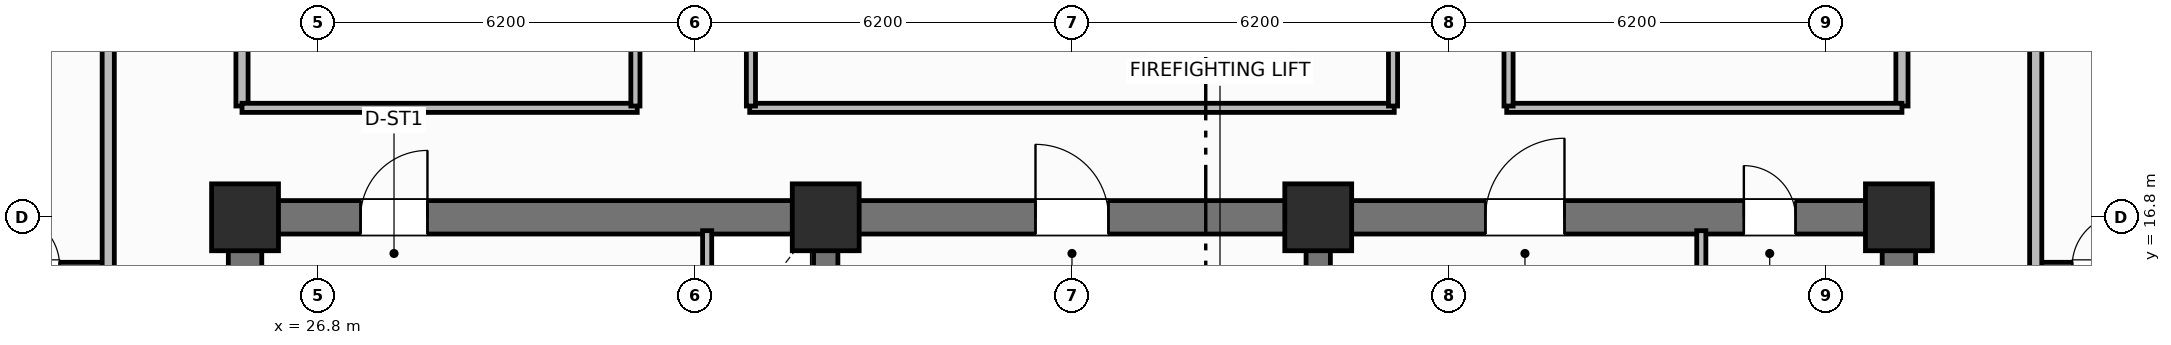
"""IFC4 building model, lengths in metres.
Left out: names, types, materials, properties, quantities, classifications, styles, units other than length and angle.
Written with IfcOpenShell. Run it as: python <this file> out.ifc"""

import sys

from ifc_helpers import new_model, si_unit, direction, frame, frame_2d, origin, origin_2d, place, context, subcontext, project, spatial, rectangle, extrude, element, fill, save


model = new_model("IFC4")
c1 = context("Model", 3, precision=1e-05, world=origin(), true_north=direction((0.0, 1.0)))
c2 = subcontext(c1, "Body", "Model", "MODEL_VIEW")
j1 = project(units=[si_unit("LENGTHUNIT", "METRE"), si_unit("PLANEANGLEUNIT", "RADIAN")], contexts=[c1])
p1 = place(None, origin())
s1 = spatial("IfcSite", under=j1, at=p1, CompositionType="ELEMENT")
p2 = place(p1, origin())
s2 = spatial("IfcBuilding", under=s1, at=p2, CompositionType="ELEMENT")
p3 = place(p2, frame((0.0, 0.0, 88.3)))
s3 = spatial("IfcBuildingStorey", under=s2, at=p3, CompositionType="ELEMENT", Elevation=88.3)
for number, where, z_axis, x_axis in (
    (1, (25.6, 10.875, 0.0), (0.0, 0.0, 1.0), (0.0, 1.0, 0.0)),
    (2, (52.8, 10.875, 0.0), (0.0, 0.0, 1.0), (0.0, 1.0, 0.0)),
):
    element("IfcWall", number, at=place(p3, frame(where, z_axis=z_axis, x_axis=x_axis)), inside=s3, PredefinedType="SHEAR", context=c2, shape_type="SweptSolid", body=[
        extrude(rectangle(XDim=5.65, YDim=0.55, at=frame_2d((2.825, 0.0))), origin(), (0.0, 0.0, 1.0), 3.7),
    ])
p4 = place(p3, frame((25.6, 16.8, 0.0), z_axis=(0.0, 0.0, 1.0), x_axis=(1.0, 0.0, 0.0)))
e3 = element("IfcWall", 3, at=p4, inside=s3, PredefinedType="SHEAR", context=c2, shape_type="SweptSolid", body=[
    extrude(rectangle(XDim=27.2, YDim=0.55, at=frame_2d((13.6, 0.0))), origin(), (0.0, 0.0, 1.0), 3.7),
])
p5 = place(p4, frame((1.9, 0.0, 0.0)))
e4 = element("IfcOpeningElement", 4, at=p5, cuts=e3, PredefinedType="OPENING", context=c2, shape_type="SweptSolid", body=[
    extrude(rectangle(XDim=1.1, YDim=2.15, at=frame_2d((0.55, 1.075))), frame((0.0, 0.285, 0.0), z_axis=(0.0, -1.0, 0.0), x_axis=(1.0, 0.0, 0.0)), (0.0, 0.0, 1.0), 0.57),
])
p6 = place(p4, frame((13.0, 0.0, 0.0)))
e5 = element("IfcOpeningElement", 5, at=p6, cuts=e3, PredefinedType="OPENING", context=c2, shape_type="SweptSolid", body=[
    extrude(rectangle(XDim=1.2, YDim=2.15, at=frame_2d((0.6, 1.075))), frame((0.0, 0.285, 0.0), z_axis=(0.0, -1.0, 0.0), x_axis=(1.0, 0.0, 0.0)), (0.0, 0.0, 1.0), 0.57),
])
p7 = place(p4, frame((20.4, 0.0, 0.0)))
e6 = element("IfcOpeningElement", 6, at=p7, cuts=e3, PredefinedType="OPENING", context=c2, shape_type="SweptSolid", body=[
    extrude(rectangle(XDim=1.3, YDim=2.2, at=frame_2d((0.65, 1.1))), frame((0.0, 0.285, 0.0), z_axis=(0.0, -1.0, 0.0), x_axis=(1.0, 0.0, 0.0)), (0.0, 0.0, 1.0), 0.57),
])
p8 = place(p4, frame((24.65, 0.0, 0.0)))
e7 = element("IfcOpeningElement", 7, at=p8, cuts=e3, PredefinedType="OPENING", context=c2, shape_type="SweptSolid", body=[
    extrude(rectangle(XDim=0.85, YDim=2.1, at=frame_2d((0.425, 1.05))), frame((0.0, 0.285, 0.0), z_axis=(0.0, -1.0, 0.0), x_axis=(1.0, 0.0, 0.0)), (0.0, 0.0, 1.0), 0.57),
])
for number, where, z_axis, x_axis in (
    (8, (35.15, 10.875, 0.0), (0.0, 0.0, 1.0), (0.0, 1.0, 0.0)),
    (9, (43.25, 10.875, 0.0), (0.0, 0.0, 1.0), (0.0, 1.0, 0.0)),
):
    element("IfcWall", number, at=place(p3, frame(where, z_axis=z_axis, x_axis=x_axis)), inside=s3, PredefinedType="SHEAR", context=c2, shape_type="SweptSolid", body=[
        extrude(rectangle(XDim=5.65, YDim=0.4, at=frame_2d((2.825, 0.0))), origin(), (0.0, 0.0, 1.0), 3.7),
    ])
for number, where, z_axis, x_axis in (
    (10, (25.6, 16.8, 0.0), (0.0, 0.0, 1.0), (1.0, 0.0, 0.0)),
    (11, (35.15, 16.8, 0.0), (0.0, 0.0, 1.0), (1.0, 0.0, 0.0)),
    (12, (43.25, 16.8, 0.0), (0.0, 0.0, 1.0), (1.0, 0.0, 0.0)),
    (13, (52.8, 16.8, 0.0), (0.0, 0.0, 1.0), (1.0, 0.0, 0.0)),
):
    element("IfcColumn", number, at=place(p3, frame(where, z_axis=z_axis, x_axis=x_axis)), inside=s3, PredefinedType="COLUMN", context=c2, shape_type="SweptSolid", body=[
        extrude(rectangle(XDim=1.1, YDim=1.1, at=origin_2d()), origin(), (0.0, 0.0, 1.0), 3.7),
    ])
p9 = place(p3, frame((33.2, 14.5, 0.0), z_axis=(0.0, 0.0, 1.0), x_axis=(0.0, 1.0, 0.0)))
e14 = element("IfcWall", 14, at=p9, inside=s3, PredefinedType="PARTITIONING", context=c2, shape_type="SweptSolid", body=[
    extrude(rectangle(XDim=2.08, YDim=0.15, at=frame_2d((1.04, 0.0))), origin(), (0.0, 0.0, 1.0), 2.53),
])
p10 = place(p9, frame((0.55, 0.0, 0.0)))
e15 = element("IfcOpeningElement", 15, at=p10, cuts=e14, PredefinedType="OPENING", context=c2, shape_type="SweptSolid", body=[
    extrude(rectangle(XDim=0.85, YDim=2.05, at=frame_2d((0.425, 1.025))), frame((0.0, 0.085, 0.0), z_axis=(0.0, -1.0, 0.0), x_axis=(1.0, 0.0, 0.0)), (0.0, 0.0, 1.0), 0.17),
])
p11 = place(p3, frame((49.55, 13.7, 0.0), z_axis=(0.0, 0.0, 1.0), x_axis=(0.0, 1.0, 0.0)))
e16 = element("IfcWall", 16, at=p11, inside=s3, PredefinedType="PARTITIONING", context=c2, shape_type="SweptSolid", body=[
    extrude(rectangle(XDim=2.88, YDim=0.15, at=frame_2d((1.44, 0.0))), origin(), (0.0, 0.0, 1.0), 2.53),
])
for number, where, z_axis, x_axis in (
    (17, (25.55, 18.63, 0.0), (0.0, 0.0, 1.0), (0.0, 1.0, 0.0)),
    (18, (52.85, 18.63, 0.0), (0.0, 0.0, 1.0), (0.0, 1.0, 0.0)),
):
    element("IfcWall", number, at=place(p3, frame(where, z_axis=z_axis, x_axis=x_axis)), inside=s3, PredefinedType="PARTITIONING", context=c2, shape_type="SweptSolid", body=[
        extrude(rectangle(XDim=19.14, YDim=0.2, at=frame_2d((9.57, 0.0))), origin(), (0.0, 0.0, 1.0), 2.53),
    ])
p12 = place(p3, frame((25.55, 18.6, 0.0), z_axis=(0.0, 0.0, 1.0), x_axis=(1.0, 0.0, 0.0)))
e19 = element("IfcWall", 19, at=p12, inside=s3, PredefinedType="PARTITIONING", context=c2, shape_type="SweptSolid", body=[
    extrude(rectangle(XDim=6.5, YDim=0.15, at=frame_2d((3.25, 0.0))), origin(), (0.0, 0.0, 1.0), 2.53),
])
p13 = place(p3, frame((33.9, 18.6, 0.0), z_axis=(0.0, 0.0, 1.0), x_axis=(1.0, 0.0, 0.0)))
e20 = element("IfcWall", 20, at=p13, inside=s3, PredefinedType="PARTITIONING", context=c2, shape_type="SweptSolid", body=[
    extrude(rectangle(XDim=10.6, YDim=0.15, at=frame_2d((5.3, 0.0))), origin(), (0.0, 0.0, 1.0), 2.53),
])
p14 = place(p3, frame((46.35, 18.6, 0.0), z_axis=(0.0, 0.0, 1.0), x_axis=(1.0, 0.0, 0.0)))
e21 = element("IfcWall", 21, at=p14, inside=s3, PredefinedType="PARTITIONING", context=c2, shape_type="SweptSolid", body=[
    extrude(rectangle(XDim=6.5, YDim=0.15, at=frame_2d((3.25, 0.0))), origin(), (0.0, 0.0, 1.0), 2.53),
])
p15 = place(p3, frame((32.02, 18.63, 0.0), z_axis=(0.0, 0.0, 1.0), x_axis=(0.0, 1.0, 0.0)))
e22 = element("IfcWall", 22, at=p15, inside=s3, PredefinedType="PARTITIONING", context=c2, shape_type="SweptSolid", body=[
    extrude(rectangle(XDim=19.14, YDim=0.15, at=frame_2d((9.57, 0.0))), origin(), (0.0, 0.0, 1.0), 2.53),
])
p16 = place(p15, frame((3.0, 0.0, 0.0)))
e23 = element("IfcOpeningElement", 23, at=p16, cuts=e22, PredefinedType="OPENING", context=c2, shape_type="SweptSolid", body=[
    extrude(rectangle(XDim=0.9, YDim=2.1, at=frame_2d((0.45, 1.05))), frame((0.0, 0.085, 0.0), z_axis=(0.0, -1.0, 0.0), x_axis=(1.0, 0.0, 0.0)), (0.0, 0.0, 1.0), 0.17),
])
p17 = place(p15, frame((11.5, 0.0, 0.0)))
e24 = element("IfcOpeningElement", 24, at=p17, cuts=e22, PredefinedType="OPENING", context=c2, shape_type="SweptSolid", body=[
    extrude(rectangle(XDim=0.9, YDim=2.1, at=frame_2d((0.45, 1.05))), frame((0.0, 0.085, 0.0), z_axis=(0.0, -1.0, 0.0), x_axis=(1.0, 0.0, 0.0)), (0.0, 0.0, 1.0), 0.17),
])
p18 = place(p3, frame((33.92, 18.63, 0.0), z_axis=(0.0, 0.0, 1.0), x_axis=(0.0, 1.0, 0.0)))
e25 = element("IfcWall", 25, at=p18, inside=s3, PredefinedType="PARTITIONING", context=c2, shape_type="SweptSolid", body=[
    extrude(rectangle(XDim=19.14, YDim=0.15, at=frame_2d((9.57, 0.0))), origin(), (0.0, 0.0, 1.0), 2.53),
])
p19 = place(p18, frame((2.4, 0.0, 0.0)))
e26 = element("IfcOpeningElement", 26, at=p19, cuts=e25, PredefinedType="OPENING", context=c2, shape_type="SweptSolid", body=[
    extrude(rectangle(XDim=0.9, YDim=2.1, at=frame_2d((0.45, 1.05))), frame((0.0, 0.085, 0.0), z_axis=(0.0, -1.0, 0.0), x_axis=(1.0, 0.0, 0.0)), (0.0, 0.0, 1.0), 0.17),
])
p20 = place(p3, frame((44.48, 18.63, 0.0), z_axis=(0.0, 0.0, 1.0), x_axis=(0.0, 1.0, 0.0)))
e27 = element("IfcWall", 27, at=p20, inside=s3, PredefinedType="PARTITIONING", context=c2, shape_type="SweptSolid", body=[
    extrude(rectangle(XDim=19.14, YDim=0.15, at=frame_2d((9.57, 0.0))), origin(), (0.0, 0.0, 1.0), 2.53),
])
p21 = place(p20, frame((8.89, 0.0, 0.0)))
e28 = element("IfcOpeningElement", 28, at=p21, cuts=e27, PredefinedType="OPENING", context=c2, shape_type="SweptSolid", body=[
    extrude(rectangle(XDim=0.9, YDim=2.1, at=frame_2d((0.45, 1.05))), frame((0.0, 0.085, 0.0), z_axis=(0.0, -1.0, 0.0), x_axis=(1.0, 0.0, 0.0)), (0.0, 0.0, 1.0), 0.17),
])
p22 = place(p3, frame((46.38, 18.63, 0.0), z_axis=(0.0, 0.0, 1.0), x_axis=(0.0, 1.0, 0.0)))
e29 = element("IfcWall", 29, at=p22, inside=s3, PredefinedType="PARTITIONING", context=c2, shape_type="SweptSolid", body=[
    extrude(rectangle(XDim=19.14, YDim=0.15, at=frame_2d((9.57, 0.0))), origin(), (0.0, 0.0, 1.0), 2.53),
])
p23 = place(p22, frame((5.5, 0.0, 0.0)))
e30 = element("IfcOpeningElement", 30, at=p23, cuts=e29, PredefinedType="OPENING", context=c2, shape_type="SweptSolid", body=[
    extrude(rectangle(XDim=1.0, YDim=2.15, at=frame_2d((0.5, 1.075))), frame((0.0, 0.085, 0.0), z_axis=(0.0, -1.0, 0.0), x_axis=(1.0, 0.0, 0.0)), (0.0, 0.0, 1.0), 0.17),
])
p24 = place(p3, frame((21.1, 16.0, 0.0), z_axis=(0.0, 0.0, 1.0), x_axis=(1.0, 0.0, 0.0)))
e31 = element("IfcWall", 31, at=p24, inside=s3, PredefinedType="PARTITIONING", context=c2, shape_type="SweptSolid", body=[
    extrude(rectangle(XDim=2.25, YDim=0.12, at=frame_2d((1.125, 0.0))), origin(), (0.0, 0.0, 1.0), 2.53),
])
p25 = place(p24, frame((0.6, 0.0, 0.0)))
e32 = element("IfcOpeningElement", 32, at=p25, cuts=e31, PredefinedType="OPENING", context=c2, shape_type="SweptSolid", body=[
    extrude(rectangle(XDim=0.85, YDim=2.1, at=frame_2d((0.425, 1.05))), frame((0.0, 0.07, 0.0), z_axis=(0.0, -1.0, 0.0), x_axis=(1.0, 0.0, 0.0)), (0.0, 0.0, 1.0), 0.14),
])
p26 = place(p3, frame((23.35, 10.6, 0.0), z_axis=(0.0, 0.0, 1.0), x_axis=(0.0, 1.0, 0.0)))
e33 = element("IfcWall", 33, at=p26, inside=s3, PredefinedType="PARTITIONING", context=c2, shape_type="SweptSolid", body=[
    extrude(rectangle(XDim=35.2, YDim=0.2, at=frame_2d((17.6, 0.0))), origin(), (0.0, 0.0, 1.0), 2.53),
])
p27 = place(p26, frame((2.65, 0.0, 0.0)))
e34 = element("IfcOpeningElement", 34, at=p27, cuts=e33, PredefinedType="OPENING", context=c2, shape_type="SweptSolid", body=[
    extrude(rectangle(XDim=1.0, YDim=2.15, at=frame_2d((0.5, 1.075))), frame((0.0, 0.11, 0.0), z_axis=(0.0, -1.0, 0.0), x_axis=(1.0, 0.0, 0.0)), (0.0, 0.0, 1.0), 0.22),
])
p28 = place(p26, frame((22.75, 0.0, 0.0)))
e35 = element("IfcOpeningElement", 35, at=p28, cuts=e33, PredefinedType="OPENING", context=c2, shape_type="SweptSolid", body=[
    extrude(rectangle(XDim=1.0, YDim=2.15, at=frame_2d((0.5, 1.075))), frame((0.0, 0.11, 0.0), z_axis=(0.0, -1.0, 0.0), x_axis=(1.0, 0.0, 0.0)), (0.0, 0.0, 1.0), 0.22),
])
p29 = place(p3, frame((55.05, 16.0, 0.0), z_axis=(0.0, 0.0, 1.0), x_axis=(1.0, 0.0, 0.0)))
e36 = element("IfcWall", 36, at=p29, inside=s3, PredefinedType="PARTITIONING", context=c2, shape_type="SweptSolid", body=[
    extrude(rectangle(XDim=2.25, YDim=0.12, at=frame_2d((1.125, 0.0))), origin(), (0.0, 0.0, 1.0), 2.53),
])
p30 = place(p29, frame((0.6, 0.0, 0.0)))
e37 = element("IfcOpeningElement", 37, at=p30, cuts=e36, PredefinedType="OPENING", context=c2, shape_type="SweptSolid", body=[
    extrude(rectangle(XDim=0.85, YDim=2.1, at=frame_2d((0.425, 1.05))), frame((0.0, 0.07, 0.0), z_axis=(0.0, -1.0, 0.0), x_axis=(1.0, 0.0, 0.0)), (0.0, 0.0, 1.0), 0.14),
])
p31 = place(p3, frame((55.05, 10.6, 0.0), z_axis=(0.0, 0.0, 1.0), x_axis=(0.0, 1.0, 0.0)))
e38 = element("IfcWall", 38, at=p31, inside=s3, PredefinedType="PARTITIONING", context=c2, shape_type="SweptSolid", body=[
    extrude(rectangle(XDim=35.2, YDim=0.2, at=frame_2d((17.6, 0.0))), origin(), (0.0, 0.0, 1.0), 2.53),
])
p32 = place(p31, frame((2.65, 0.0, 0.0)))
e39 = element("IfcOpeningElement", 39, at=p32, cuts=e38, PredefinedType="OPENING", context=c2, shape_type="SweptSolid", body=[
    extrude(rectangle(XDim=1.0, YDim=2.15, at=frame_2d((0.5, 1.075))), frame((0.0, 0.11, 0.0), z_axis=(0.0, -1.0, 0.0), x_axis=(1.0, 0.0, 0.0)), (0.0, 0.0, 1.0), 0.22),
])
p33 = place(p31, frame((11.814, 0.0, 0.0)))
e40 = element("IfcOpeningElement", 40, at=p33, cuts=e38, PredefinedType="OPENING", context=c2, shape_type="SweptSolid", body=[
    extrude(rectangle(XDim=1.0, YDim=2.15, at=frame_2d((0.5, 1.075))), frame((0.0, 0.11, 0.0), z_axis=(0.0, -1.0, 0.0), x_axis=(1.0, 0.0, 0.0)), (0.0, 0.0, 1.0), 0.22),
])
p34 = place(p31, frame((23.65, 0.0, 0.0)))
e41 = element("IfcOpeningElement", 41, at=p34, cuts=e38, PredefinedType="OPENING", context=c2, shape_type="SweptSolid", body=[
    extrude(rectangle(XDim=1.0, YDim=2.15, at=frame_2d((0.5, 1.075))), frame((0.0, 0.11, 0.0), z_axis=(0.0, -1.0, 0.0), x_axis=(1.0, 0.0, 0.0)), (0.0, 0.0, 1.0), 0.22),
])
p35 = place(p25, origin())
e42 = element("IfcDoor", 42, at=p35, inside=s3, OperationType="SINGLE_SWING_LEFT", PredefinedType="DOOR", context=c2, shape_type="SweptSolid", body=[
    extrude(rectangle(XDim=0.85, YDim=2.1, at=frame_2d((0.425, 1.05))), frame((0.0, 0.025, 0.0), z_axis=(0.0, -1.0, 0.0), x_axis=(1.0, 0.0, 0.0)), (0.0, 0.0, 1.0), 0.05),
])
fill(e32, e42)
p36 = place(p30, origin())
e43 = element("IfcDoor", 43, at=p36, inside=s3, OperationType="SINGLE_SWING_RIGHT", PredefinedType="DOOR", context=c2, shape_type="SweptSolid", body=[
    extrude(rectangle(XDim=0.85, YDim=2.1, at=frame_2d((0.425, 1.05))), frame((0.0, 0.025, 0.0), z_axis=(0.0, -1.0, 0.0), x_axis=(1.0, 0.0, 0.0)), (0.0, 0.0, 1.0), 0.05),
])
fill(e37, e43)
p37 = place(p5, origin())
e44 = element("IfcDoor", 44, at=p37, inside=s3, OperationType="SINGLE_SWING_RIGHT", PredefinedType="DOOR", context=c2, shape_type="SweptSolid", body=[
    extrude(rectangle(XDim=1.1, YDim=2.15, at=frame_2d((0.55, 1.075))), frame((0.0, 0.025, 0.0), z_axis=(0.0, -1.0, 0.0), x_axis=(1.0, 0.0, 0.0)), (0.0, 0.0, 1.0), 0.05),
])
fill(e4, e44)
p38 = place(p6, origin())
e45 = element("IfcDoor", 45, at=p38, inside=s3, OperationType="SINGLE_SWING_LEFT", PredefinedType="DOOR", context=c2, shape_type="SweptSolid", body=[
    extrude(rectangle(XDim=1.2, YDim=2.15, at=frame_2d((0.6, 1.075))), frame((0.0, 0.025, 0.0), z_axis=(0.0, -1.0, 0.0), x_axis=(1.0, 0.0, 0.0)), (0.0, 0.0, 1.0), 0.05),
])
fill(e5, e45)
p39 = place(p7, origin())
e46 = element("IfcDoor", 46, at=p39, inside=s3, OperationType="SINGLE_SWING_RIGHT", PredefinedType="DOOR", context=c2, shape_type="SweptSolid", body=[
    extrude(rectangle(XDim=1.3, YDim=2.2, at=frame_2d((0.65, 1.1))), frame((0.0, 0.025, 0.0), z_axis=(0.0, -1.0, 0.0), x_axis=(1.0, 0.0, 0.0)), (0.0, 0.0, 1.0), 0.05),
])
fill(e6, e46)
p40 = place(p8, origin())
e47 = element("IfcDoor", 47, at=p40, inside=s3, OperationType="SINGLE_SWING_LEFT", PredefinedType="DOOR", context=c2, shape_type="SweptSolid", body=[
    extrude(rectangle(XDim=0.85, YDim=2.1, at=frame_2d((0.425, 1.05))), frame((0.0, 0.025, 0.0), z_axis=(0.0, -1.0, 0.0), x_axis=(1.0, 0.0, 0.0)), (0.0, 0.0, 1.0), 0.05),
])
fill(e7, e47)
save(model, sys.argv[1])
